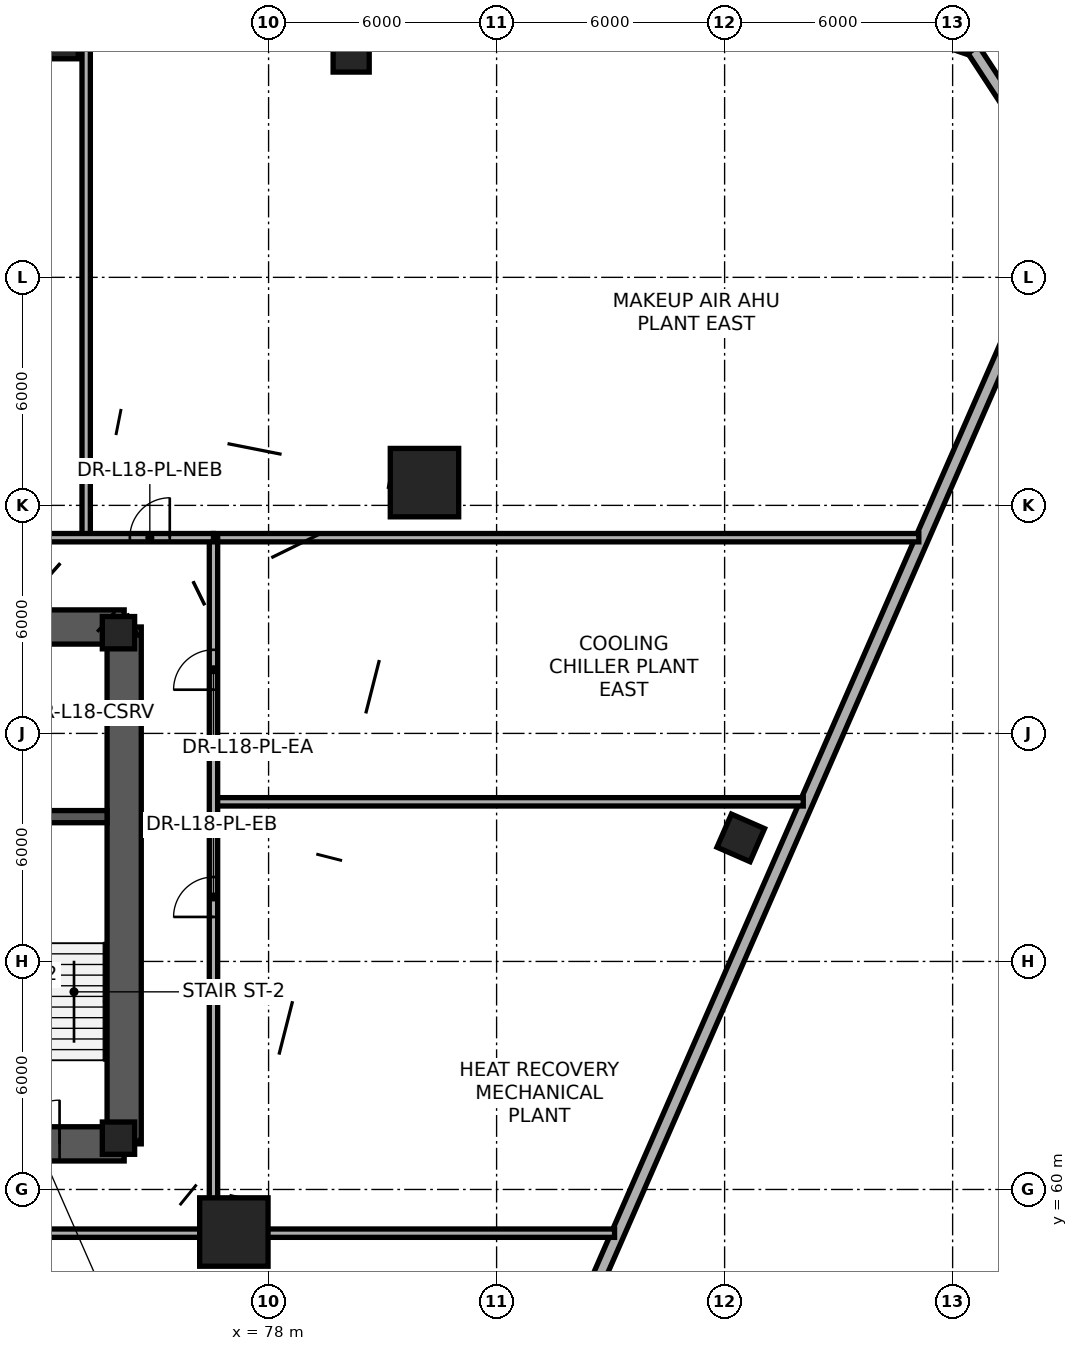
"""IFC4 building model, lengths in metres.
Left out: names, types, materials, properties, quantities, classifications, styles, units other than length and angle.
Written with IfcOpenShell. Run it as: python <this file> out.ifc"""

import sys

from ifc_helpers import new_model, si_unit, direction, frame, frame_2d, origin, origin_2d, place, context, subcontext, project, spatial, rectangle, extrude, element, fill, save


model = new_model("IFC4")
c1 = context("Model", 3, precision=1e-05, world=origin(), true_north=direction((0.0, 1.0)))
c2 = subcontext(c1, "Body", "Model", "MODEL_VIEW")
j1 = project(units=[si_unit("LENGTHUNIT", "METRE"), si_unit("PLANEANGLEUNIT", "RADIAN")], contexts=[c1])
p1 = place(None, origin())
s1 = spatial("IfcSite", under=j1, at=p1, CompositionType="ELEMENT")
p2 = place(p1, origin())
s2 = spatial("IfcBuilding", under=s1, at=p2, CompositionType="ELEMENT")
p3 = place(p2, frame((0.0, 0.0, 70.8)))
s3 = spatial("IfcBuildingStorey", under=s2, at=p3, CompositionType="ELEMENT", Elevation=70.8)
p4 = place(p3, frame((57.8, 61.2, 0.0), z_axis=(0.0, 0.0, 1.0), x_axis=(1.0, 0.0, 0.0)))
e1 = element("IfcWall", 1, at=p4, inside=s3, PredefinedType="SHEAR", context=c2, shape_type="SweptSolid", body=[
    extrude(rectangle(XDim=16.4, YDim=0.9, at=frame_2d((8.2, 0.0))), origin(), (0.0, 0.0, 1.0), 4.2),
])
p5 = place(p4, frame((1.35, 0.0, 0.0)))
e2 = element("IfcOpeningElement", 2, at=p5, cuts=e1, PredefinedType="OPENING", context=c2, shape_type="SweptSolid", body=[
    extrude(rectangle(XDim=1.15, YDim=2.15, at=frame_2d((0.575, 1.075))), frame((0.0, 0.46, 0.0), z_axis=(0.0, -1.0, 0.0), x_axis=(1.0, 0.0, 0.0)), (0.0, 0.0, 1.0), 0.92),
])
p6 = place(p4, frame((6.1, 0.0, 0.0)))
e3 = element("IfcOpeningElement", 3, at=p6, cuts=e1, PredefinedType="OPENING", context=c2, shape_type="SweptSolid", body=[
    extrude(rectangle(XDim=1.6, YDim=2.15, at=frame_2d((0.8, 1.075))), frame((0.0, 0.46, 0.0), z_axis=(0.0, -1.0, 0.0), x_axis=(1.0, 0.0, 0.0)), (0.0, 0.0, 1.0), 0.92),
])
p7 = place(p4, frame((13.55, 0.0, 0.0)))
e4 = element("IfcOpeningElement", 4, at=p7, cuts=e1, PredefinedType="OPENING", context=c2, shape_type="SweptSolid", body=[
    extrude(rectangle(XDim=1.15, YDim=2.15, at=frame_2d((0.575, 1.075))), frame((0.0, 0.46, 0.0), z_axis=(0.0, -1.0, 0.0), x_axis=(1.0, 0.0, 0.0)), (0.0, 0.0, 1.0), 0.92),
])
p8 = place(p3, frame((74.2, 61.2, 0.0), z_axis=(0.0, 0.0, 1.0), x_axis=(0.0, 1.0, 0.0)))
e5 = element("IfcWall", 5, at=p8, inside=s3, PredefinedType="SHEAR", context=c2, shape_type="SweptSolid", body=[
    extrude(rectangle(XDim=13.6, YDim=0.9, at=frame_2d((6.8, 0.0))), origin(), (0.0, 0.0, 1.0), 4.2),
])
p9 = place(p3, frame((74.2, 74.8, 0.0), z_axis=(0.0, 0.0, 1.0), x_axis=(-1.0, 0.0, 0.0)))
e6 = element("IfcWall", 6, at=p9, inside=s3, PredefinedType="SHEAR", context=c2, shape_type="SweptSolid", body=[
    extrude(rectangle(XDim=7.35, YDim=0.9, at=frame_2d((3.675, 0.0))), origin(), (0.0, 0.0, 1.0), 4.2),
])
p10 = place(p3, frame((69.91, 69.81, 0.0), z_axis=(0.0, 0.0, 1.0), x_axis=(1.0, 0.0, 0.0)))
e7 = element("IfcWall", 7, at=p10, inside=s3, PredefinedType="SHEAR", context=c2, shape_type="SweptSolid", body=[
    extrude(rectangle(XDim=3.84, YDim=0.32, at=frame_2d((1.92, 0.0))), origin(), (0.0, 0.0, 1.0), 4.2),
])
for number, where, z_axis, x_axis in (
    (8, (74.05, 61.35, 0.0), (0.0, 0.0, 1.0), (1.0, 0.0, 0.0)),
    (9, (74.05, 74.65, 0.0), (0.0, 0.0, 1.0), (1.0, 0.0, 0.0)),
):
    element("IfcColumn", number, at=place(p3, frame(where, z_axis=z_axis, x_axis=x_axis)), inside=s3, PredefinedType="COLUMN", context=c2, shape_type="SweptSolid", body=[
        extrude(rectangle(XDim=0.85, YDim=0.85, at=origin_2d()), origin(), (0.0, 0.0, 1.0), 4.2),
    ])
for number, where, z_axis, x_axis in (
    (10, (82.102, 78.599, 0.0), (0.0, 0.0, 1.0), (1.0, 0.0, 0.0)),
    (11, (77.086, 58.88, 0.0), (0.0, 0.0, 1.0), (1.0, 0.0, 0.0)),
):
    element("IfcColumn", number, at=place(p3, frame(where, z_axis=z_axis, x_axis=x_axis)), inside=s3, PredefinedType="COLUMN", context=c2, shape_type="SweptSolid", body=[
        extrude(rectangle(XDim=1.8, YDim=1.8, at=origin_2d()), origin(), (0.0, 0.0, 1.0), 4.2),
    ])
p11 = place(p3, frame((90.496, 69.261, 0.003), z_axis=(-0.034091159892, -0.005003139506, 0.99940620441), x_axis=(0.964106610004, -0.263632228909, 0.03156726828)))
e12 = element("IfcColumn", 12, at=p11, inside=s3, PredefinedType="COLUMN", context=c2, shape_type="SweptSolid", body=[
    extrude(rectangle(XDim=0.95, YDim=0.95, at=origin_2d()), origin(), (0.0, 0.0, 1.0), 4.197),
])
p12 = place(p3, frame((80.222, 89.937, 0.003), z_axis=(-0.023326184215, -0.02914318776, 0.999303038991), x_axis=(-0.780716755404, 0.624885067698, 0.0)))
e13 = element("IfcColumn", 13, at=p12, inside=s3, PredefinedType="COLUMN", context=c2, shape_type="SweptSolid", body=[
    extrude(rectangle(XDim=0.95, YDim=0.95, at=origin_2d()), origin(), (0.0, 0.0, 1.0), 4.197),
])
p13 = place(p3, frame((72.564, 90.037, 0.003), z_axis=(-0.010763761875, -0.029149430808, 0.999517109465), x_axis=(-0.9380871136, 0.346399433166, 0.0)))
e14 = element("IfcColumn", 14, at=p13, inside=s3, PredefinedType="PILASTER", context=c2, shape_type="SweptSolid", body=[
    extrude(rectangle(XDim=0.9, YDim=0.45, at=origin_2d()), origin(), (0.0, 0.0, 1.0), 4.196),
])
p14 = place(p3, frame((93.35, 91.087, 0.0), z_axis=(0.0, 0.0, 1.0), x_axis=(0.945861583966, -0.324570275868, 0.0)))
e15 = element("IfcWall", 15, at=p14, inside=s3, PredefinedType="STANDARD", context=c2, shape_type="SweptSolid", body=[
    extrude(rectangle(XDim=3.375, YDim=0.34, at=frame_2d((1.688, 0.0))), origin(), (0.0, 0.0, 1.0), 3.925),
])
p15 = place(p3, frame((96.542, 89.992, 0.0), z_axis=(0.0, 0.0, 1.0), x_axis=(0.54736822803, -0.83689188247, 0.0)))
e16 = element("IfcWall", 16, at=p15, inside=s3, PredefinedType="STANDARD", context=c2, shape_type="SweptSolid", body=[
    extrude(rectangle(XDim=3.375, YDim=0.34, at=frame_2d((1.688, 0.0))), origin(), (0.0, 0.0, 1.0), 3.925),
])
p16 = place(p3, frame((98.114, 83.803, 0.0), z_axis=(0.0, 0.0, 1.0), x_axis=(-0.400832536075, -0.916151340131, 0.0)))
e17 = element("IfcWall", 17, at=p16, inside=s3, PredefinedType="STANDARD", context=c2, shape_type="SweptSolid", body=[
    extrude(rectangle(XDim=68.233, YDim=0.34, at=frame_2d((34.117, 0.0))), origin(), (0.0, 0.0, 1.0), 0.85),
])
p17 = place(p3, frame((73.2, 77.15, 0.0), z_axis=(0.0, 0.0, 1.0), x_axis=(0.0, 1.0, 0.0)))
e18 = element("IfcWall", 18, at=p17, inside=s3, PredefinedType="PARTITIONING", context=c2, shape_type="SweptSolid", body=[
    extrude(rectangle(XDim=13.852, YDim=0.22, at=frame_2d((6.926, 0.0))), origin(), (0.0, 0.0, 1.0), 3.055),
])
p18 = place(p3, frame((76.55, 77.15, 0.0), z_axis=(0.0, 0.0, 1.0), x_axis=(1.0, 0.0, 0.0)))
e19 = element("IfcWall", 19, at=p18, inside=s3, PredefinedType="PARTITIONING", context=c2, shape_type="SweptSolid", body=[
    extrude(rectangle(XDim=18.561, YDim=0.22, at=frame_2d((9.28, 0.0))), origin(), (0.0, 0.0, 1.0), 3.055),
])
p19 = place(p3, frame((76.55, 70.2, 0.0), z_axis=(0.0, 0.0, 1.0), x_axis=(1.0, 0.0, 0.0)))
e20 = element("IfcWall", 20, at=p19, inside=s3, PredefinedType="PARTITIONING", context=c2, shape_type="SweptSolid", body=[
    extrude(rectangle(XDim=15.52, YDim=0.22, at=frame_2d((7.76, 0.0))), origin(), (0.0, 0.0, 1.0), 3.055),
])
p20 = place(p3, frame((76.55, 58.85, 0.0), z_axis=(0.0, 0.0, 1.0), x_axis=(1.0, 0.0, 0.0)))
e21 = element("IfcWall", 21, at=p20, inside=s3, PredefinedType="PARTITIONING", context=c2, shape_type="SweptSolid", body=[
    extrude(rectangle(XDim=10.554, YDim=0.22, at=frame_2d((5.277, 0.0))), origin(), (0.0, 0.0, 1.0), 3.055),
])
p21 = place(p3, frame((55.45, 58.85, 0.0), z_axis=(0.0, 0.0, 1.0), x_axis=(1.0, 0.0, 0.0)))
e22 = element("IfcWall", 22, at=p21, inside=s3, PredefinedType="PARTITIONING", context=c2, shape_type="SweptSolid", body=[
    extrude(rectangle(XDim=21.1, YDim=0.22, at=frame_2d((10.55, 0.0))), origin(), (0.0, 0.0, 1.0), 3.205),
])
p22 = place(p21, frame((9.8, 0.0, 0.0)))
e23 = element("IfcOpeningElement", 23, at=p22, cuts=e22, PredefinedType="OPENING", context=c2, shape_type="SweptSolid", body=[
    extrude(rectangle(XDim=1.5, YDim=2.2, at=frame_2d((0.75, 1.1))), frame((0.0, 0.12, 0.0), z_axis=(0.0, -1.0, 0.0), x_axis=(1.0, 0.0, 0.0)), (0.0, 0.0, 1.0), 0.24),
])
p23 = place(p3, frame((76.55, 58.85, 0.0), z_axis=(0.0, 0.0, 1.0), x_axis=(0.0, 1.0, 0.0)))
e24 = element("IfcWall", 24, at=p23, inside=s3, PredefinedType="PARTITIONING", context=c2, shape_type="SweptSolid", body=[
    extrude(rectangle(XDim=18.3, YDim=0.22, at=frame_2d((9.15, 0.0))), origin(), (0.0, 0.0, 1.0), 3.205),
])
p24 = place(p23, frame((8.321, 0.0, 0.0)))
e25 = element("IfcOpeningElement", 25, at=p24, cuts=e24, PredefinedType="OPENING", context=c2, shape_type="SweptSolid", body=[
    extrude(rectangle(XDim=1.05, YDim=2.15, at=frame_2d((0.525, 1.075))), frame((0.0, 0.12, 0.0), z_axis=(0.0, -1.0, 0.0), x_axis=(1.0, 0.0, 0.0)), (0.0, 0.0, 1.0), 0.24),
])
p25 = place(p23, frame((14.3, 0.0, 0.0)))
e26 = element("IfcOpeningElement", 26, at=p25, cuts=e24, PredefinedType="OPENING", context=c2, shape_type="SweptSolid", body=[
    extrude(rectangle(XDim=1.05, YDim=2.15, at=frame_2d((0.525, 1.075))), frame((0.0, 0.12, 0.0), z_axis=(0.0, -1.0, 0.0), x_axis=(1.0, 0.0, 0.0)), (0.0, 0.0, 1.0), 0.24),
])
p26 = place(p3, frame((55.45, 77.15, 0.0), z_axis=(0.0, 0.0, 1.0), x_axis=(1.0, 0.0, 0.0)))
e27 = element("IfcWall", 27, at=p26, inside=s3, PredefinedType="PARTITIONING", context=c2, shape_type="SweptSolid", body=[
    extrude(rectangle(XDim=21.1, YDim=0.22, at=frame_2d((10.55, 0.0))), origin(), (0.0, 0.0, 1.0), 3.205),
])
p27 = place(p26, frame((1.25, 0.0, 0.0)))
e28 = element("IfcOpeningElement", 28, at=p27, cuts=e27, PredefinedType="OPENING", context=c2, shape_type="SweptSolid", body=[
    extrude(rectangle(XDim=1.05, YDim=2.15, at=frame_2d((0.525, 1.075))), frame((0.0, 0.12, 0.0), z_axis=(0.0, -1.0, 0.0), x_axis=(1.0, 0.0, 0.0)), (0.0, 0.0, 1.0), 0.24),
])
p28 = place(p26, frame((6.525, 0.0, 0.0)))
e29 = element("IfcOpeningElement", 29, at=p28, cuts=e27, PredefinedType="OPENING", context=c2, shape_type="SweptSolid", body=[
    extrude(rectangle(XDim=1.05, YDim=2.15, at=frame_2d((0.525, 1.075))), frame((0.0, 0.12, 0.0), z_axis=(0.0, -1.0, 0.0), x_axis=(1.0, 0.0, 0.0)), (0.0, 0.0, 1.0), 0.24),
])
p29 = place(p26, frame((11.801, 0.0, 0.0)))
e30 = element("IfcOpeningElement", 30, at=p29, cuts=e27, PredefinedType="OPENING", context=c2, shape_type="SweptSolid", body=[
    extrude(rectangle(XDim=1.05, YDim=2.15, at=frame_2d((0.525, 1.075))), frame((0.0, 0.12, 0.0), z_axis=(0.0, -1.0, 0.0), x_axis=(1.0, 0.0, 0.0)), (0.0, 0.0, 1.0), 0.24),
])
p30 = place(p26, frame((18.9, 0.0, 0.0)))
e31 = element("IfcOpeningElement", 31, at=p30, cuts=e27, PredefinedType="OPENING", context=c2, shape_type="SweptSolid", body=[
    extrude(rectangle(XDim=1.05, YDim=2.15, at=frame_2d((0.525, 1.075))), frame((0.0, 0.12, 0.0), z_axis=(0.0, -1.0, 0.0), x_axis=(1.0, 0.0, 0.0)), (0.0, 0.0, 1.0), 0.24),
])
p31 = place(p7, origin())
e32 = element("IfcDoor", 32, at=p31, inside=s3, OperationType="SINGLE_SWING_RIGHT", PredefinedType="DOOR", context=c2, shape_type="SweptSolid", body=[
    extrude(rectangle(XDim=1.15, YDim=2.15, at=frame_2d((0.575, 1.075))), frame((0.0, 0.025, 0.0), z_axis=(0.0, -1.0, 0.0), x_axis=(1.0, 0.0, 0.0)), (0.0, 0.0, 1.0), 0.05),
])
fill(e4, e32)
p32 = place(p24, origin())
e33 = element("IfcDoor", 33, at=p32, inside=s3, OperationType="SINGLE_SWING_LEFT", PredefinedType="DOOR", context=c2, shape_type="SweptSolid", body=[
    extrude(rectangle(XDim=1.05, YDim=2.15, at=frame_2d((0.525, 1.075))), frame((0.0, 0.025, 0.0), z_axis=(0.0, -1.0, 0.0), x_axis=(1.0, 0.0, 0.0)), (0.0, 0.0, 1.0), 0.05),
])
fill(e25, e33)
p33 = place(p25, origin())
e34 = element("IfcDoor", 34, at=p33, inside=s3, OperationType="SINGLE_SWING_LEFT", PredefinedType="DOOR", context=c2, shape_type="SweptSolid", body=[
    extrude(rectangle(XDim=1.05, YDim=2.15, at=frame_2d((0.525, 1.075))), frame((0.0, 0.025, 0.0), z_axis=(0.0, -1.0, 0.0), x_axis=(1.0, 0.0, 0.0)), (0.0, 0.0, 1.0), 0.05),
])
fill(e26, e34)
p34 = place(p30, origin())
e35 = element("IfcDoor", 35, at=p34, inside=s3, OperationType="SINGLE_SWING_RIGHT", PredefinedType="DOOR", context=c2, shape_type="SweptSolid", body=[
    extrude(rectangle(XDim=1.05, YDim=2.15, at=frame_2d((0.525, 1.075))), frame((0.0, 0.025, 0.0), z_axis=(0.0, -1.0, 0.0), x_axis=(1.0, 0.0, 0.0)), (0.0, 0.0, 1.0), 0.05),
])
fill(e31, e35)
save(model, sys.argv[1])
